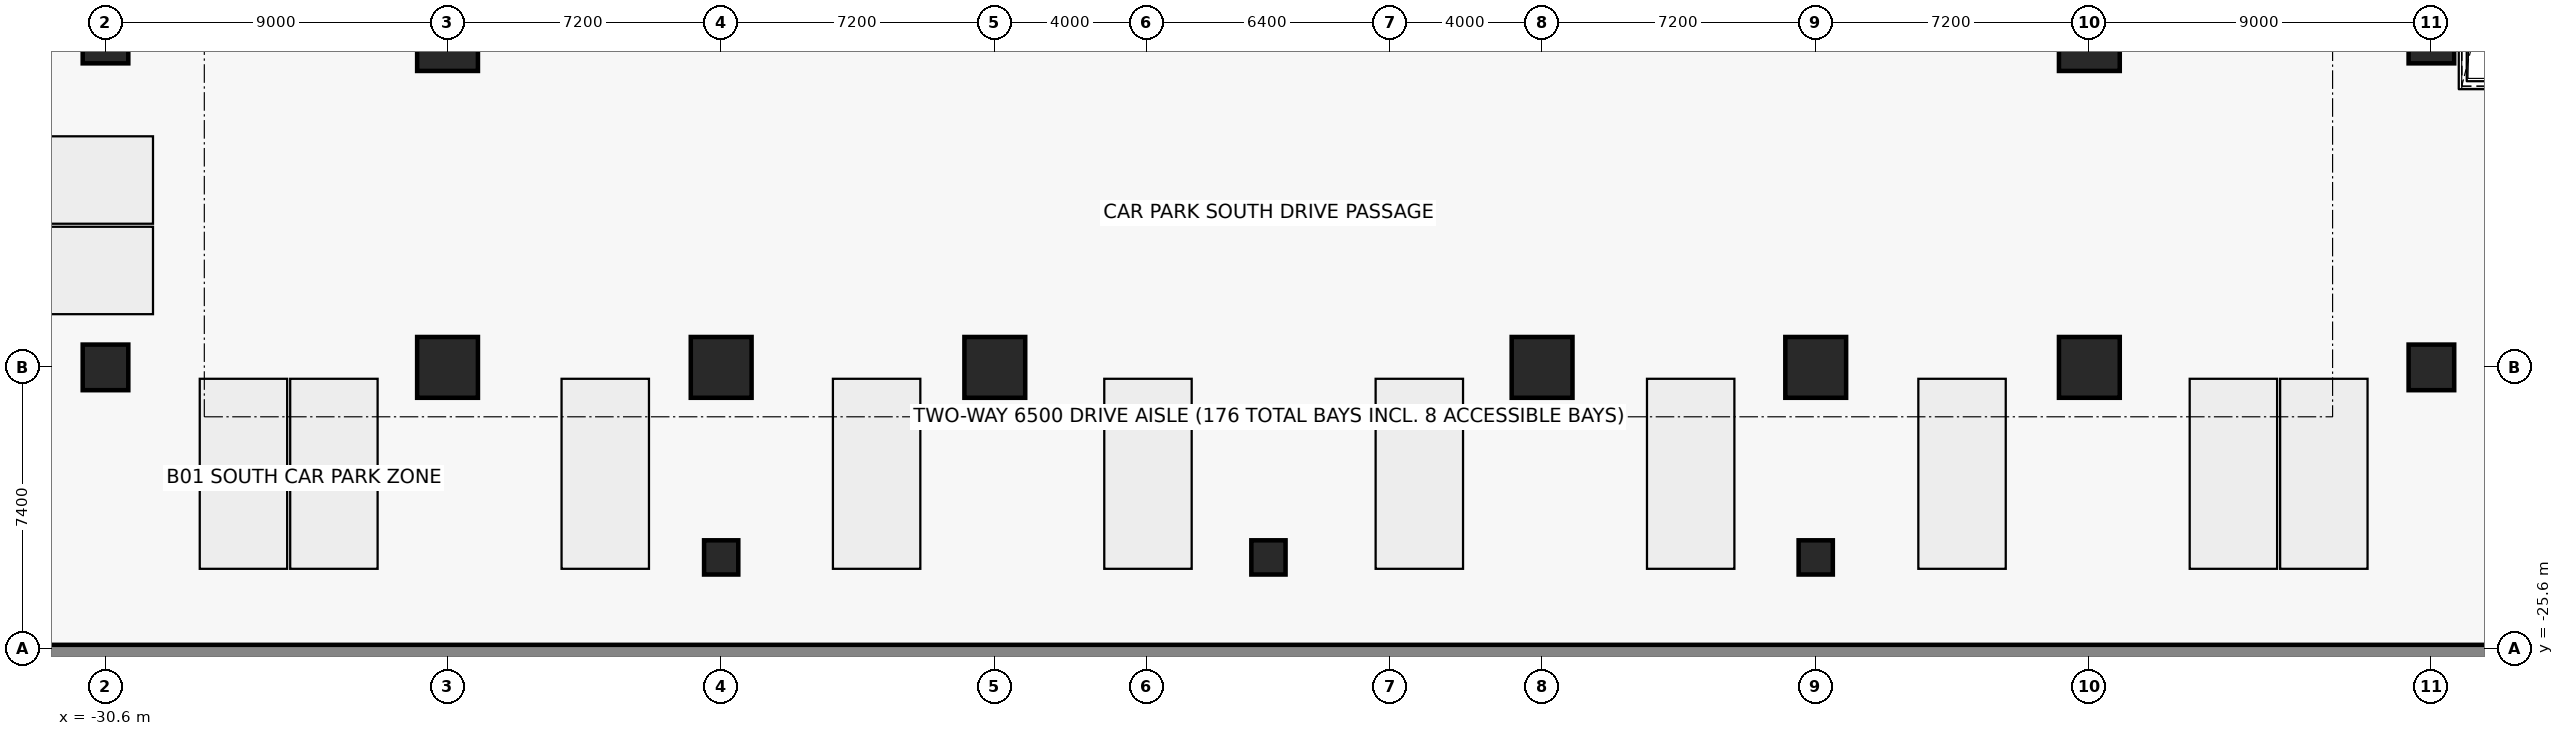
"""IFC4 building model, lengths in metres.
Left out: names, types, materials, properties, quantities, classifications, styles, units other than length and angle.
Written with IfcOpenShell. Run it as: python <this file> out.ifc"""

import sys

from ifc_helpers import new_model, si_unit, direction, frame, frame_2d, origin, origin_2d, place, context, subcontext, project, spatial, rectangle, extrude, element, save


model = new_model("IFC4")
c1 = context("Model", 3, precision=1e-05, world=origin(), true_north=direction((0.0, 1.0)))
c2 = subcontext(c1, "Body", "Model", "MODEL_VIEW")
j1 = project(units=[si_unit("LENGTHUNIT", "METRE"), si_unit("PLANEANGLEUNIT", "RADIAN")], contexts=[c1])
p1 = place(None, origin())
s1 = spatial("IfcSite", under=j1, at=p1, CompositionType="ELEMENT")
p2 = place(p1, origin())
s2 = spatial("IfcBuilding", under=s1, at=p2, CompositionType="ELEMENT")
p3 = place(p2, frame((0.0, 0.0, -4.4)))
s3 = spatial("IfcBuildingStorey", under=s2, at=p3, CompositionType="ELEMENT", Elevation=-4.4)
p4 = place(p3, frame((37.1, -25.85, 0.0), z_axis=(0.0, 0.0, 1.0), x_axis=(-1.0, 0.0, 0.0)))
e1 = element("IfcWall", 1, at=p4, inside=s3, PredefinedType="USERDEFINED", context=c2, shape_type="SweptSolid", body=[
    extrude(rectangle(XDim=74.2, YDim=0.7, at=frame_2d((37.1, 0.0))), origin(), (0.0, 0.0, 1.0), 4.1),
])
for number, where, z_axis, x_axis in (
    (2, (-21.6, -18.2, 0.0), (0.0, 0.0, 1.0), (1.0, 0.0, 0.0)),
    (3, (-14.4, -18.2, 0.0), (0.0, 0.0, 1.0), (1.0, 0.0, 0.0)),
    (4, (-7.2, -18.2, 0.0), (0.0, 0.0, 1.0), (1.0, 0.0, 0.0)),
    (5, (7.2, -18.2, 0.0), (0.0, 0.0, 1.0), (1.0, 0.0, 0.0)),
    (6, (14.4, -18.2, 0.0), (0.0, 0.0, 1.0), (1.0, 0.0, 0.0)),
    (7, (21.6, -18.2, 0.0), (0.0, 0.0, 1.0), (1.0, 0.0, 0.0)),
    (8, (-21.6, -9.6, 0.0), (0.0, 0.0, 1.0), (1.0, 0.0, 0.0)),
    (9, (21.6, -9.6, 0.0), (0.0, 0.0, 1.0), (1.0, 0.0, 0.0)),
):
    element("IfcColumn", number, at=place(p3, frame(where, z_axis=z_axis, x_axis=x_axis)), inside=s3, PredefinedType="COLUMN", context=c2, shape_type="SweptSolid", body=[
        extrude(rectangle(XDim=1.6, YDim=1.6, at=origin_2d()), origin(), (0.0, 0.0, 1.0), 4.4),
    ])
for number, where, z_axis, x_axis in (
    (10, (-30.6, -18.2, 0.0), (0.0, 0.0, 1.0), (1.0, 0.0, 0.0)),
    (11, (-30.6, -9.6, 0.0), (0.0, 0.0, 1.0), (1.0, 0.0, 0.0)),
    (12, (30.6, -18.2, 0.0), (0.0, 0.0, 1.0), (1.0, 0.0, 0.0)),
    (13, (30.6, -9.6, 0.0), (0.0, 0.0, 1.0), (1.0, 0.0, 0.0)),
):
    element("IfcColumn", number, at=place(p3, frame(where, z_axis=z_axis, x_axis=x_axis)), inside=s3, PredefinedType="COLUMN", context=c2, shape_type="SweptSolid", body=[
        extrude(rectangle(XDim=1.2, YDim=1.2, at=origin_2d()), origin(), (0.0, 0.0, 1.0), 4.4),
    ])
for number, where, z_axis, x_axis in (
    (14, (-14.4, -23.2, 0.0), (0.0, 0.0, 1.0), (1.0, 0.0, 0.0)),
    (15, (0.0, -23.2, 0.0), (0.0, 0.0, 1.0), (1.0, 0.0, 0.0)),
    (16, (14.4, -23.2, 0.0), (0.0, 0.0, 1.0), (1.0, 0.0, 0.0)),
):
    element("IfcColumn", number, at=place(p3, frame(where, z_axis=z_axis, x_axis=x_axis)), inside=s3, PredefinedType="COLUMN", context=c2, shape_type="SweptSolid", body=[
        extrude(rectangle(XDim=0.9, YDim=0.9, at=origin_2d()), origin(), (0.0, 0.0, 1.0), 4.4),
    ])
save(model, sys.argv[1])
